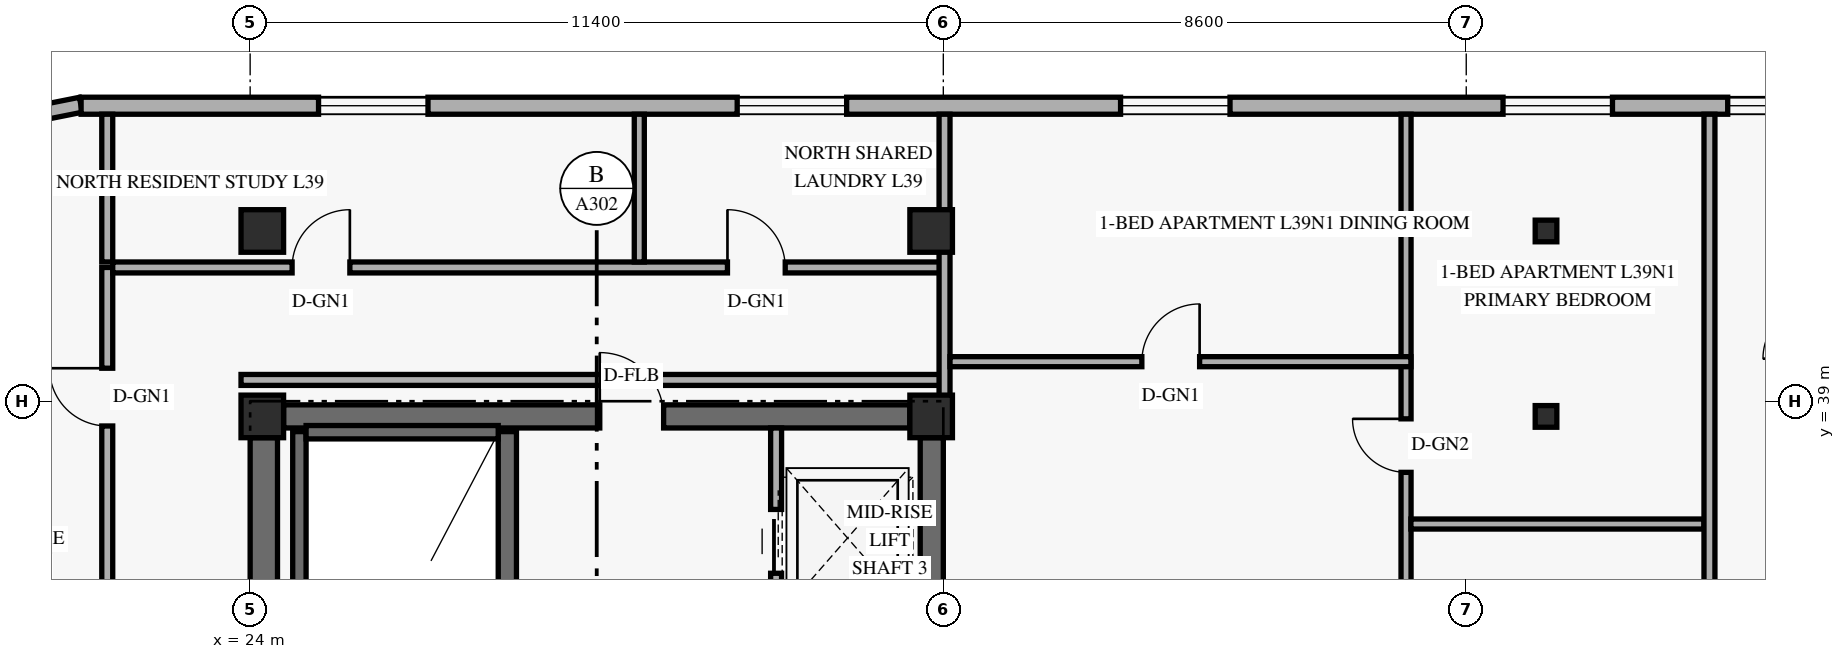
"""IFC4 building model, lengths in metres.
Left out: names, types, materials, properties, quantities, classifications, styles, units other than length and angle.
Written with IfcOpenShell. Run it as: python <this file> out.ifc"""

import sys

from ifc_helpers import new_model, si_unit, direction, frame, frame_2d, origin, origin_2d, place, context, subcontext, project, spatial, rectangle, hollow_rectangle, extrude, element, fill, save


model = new_model("IFC4")
c1 = context("Model", 3, precision=1e-05, world=origin(), true_north=direction((0.0, 1.0)))
c2 = subcontext(c1, "Body", "Model", "MODEL_VIEW")
j1 = project(units=[si_unit("LENGTHUNIT", "METRE"), si_unit("PLANEANGLEUNIT", "RADIAN")], contexts=[c1])
p1 = place(None, origin())
s1 = spatial("IfcSite", under=j1, at=p1, CompositionType="ELEMENT")
p2 = place(p1, origin())
s2 = spatial("IfcBuilding", under=s1, at=p2, CompositionType="ELEMENT")
p3 = place(p2, frame((0.0, 0.0, 151.8)))
s3 = spatial("IfcBuildingStorey", under=s2, at=p3, CompositionType="ELEMENT", Elevation=151.8)
p4 = place(p3, frame((24.225, 30.55, 0.0), z_axis=(0.0, 0.0, 1.0), x_axis=(0.0, 1.0, 0.0)))
e1 = element("IfcWall", 1, at=p4, inside=s3, PredefinedType="SHEAR", context=c2, shape_type="SweptSolid", body=[
    extrude(rectangle(XDim=7.85, YDim=0.45, at=frame_2d((3.925, 0.0))), origin(), (0.0, 0.0, 1.0), 2.748),
])
p5 = place(p3, frame((35.21, 31.35, 0.0), z_axis=(0.0, 0.0, 1.0), x_axis=(0.0, 1.0, 0.0)))
e2 = element("IfcWall", 2, at=p5, inside=s3, PredefinedType="SHEAR", context=c2, shape_type="SweptSolid", body=[
    extrude(rectangle(XDim=7.05, YDim=0.38, at=frame_2d((3.525, 0.0))), origin(), (0.0, 0.0, 1.0), 2.748),
])
p6 = place(p3, frame((24.55, 38.75, 0.0), z_axis=(0.0, 0.0, 1.0), x_axis=(1.0, 0.0, 0.0)))
e3 = element("IfcWall", 3, at=p6, inside=s3, PredefinedType="SHEAR", context=c2, shape_type="SweptSolid", body=[
    extrude(rectangle(XDim=10.3, YDim=0.38, at=frame_2d((5.15, 0.0))), origin(), (0.0, 0.0, 1.0), 3.36),
])
p7 = place(p6, frame((5.2, 0.0, 0.0)))
e4 = element("IfcOpeningElement", 4, at=p7, cuts=e3, PredefinedType="OPENING", context=c2, shape_type="SweptSolid", body=[
    extrude(rectangle(XDim=1.05, YDim=2.15, at=frame_2d((0.525, 1.075))), frame((0.0, 0.2, 0.0), z_axis=(0.0, -1.0, 0.0), x_axis=(1.0, 0.0, 0.0)), (0.0, 0.0, 1.0), 0.4),
])
p8 = place(p3, frame((24.81, 30.74, 0.0), z_axis=(0.0, 0.0, 1.0), x_axis=(0.0, 1.0, 0.0)))
e5 = element("IfcWall", 5, at=p8, inside=s3, PredefinedType="SHEAR", context=c2, shape_type="SweptSolid", body=[
    extrude(rectangle(XDim=7.76, YDim=0.22, at=frame_2d((3.88, 0.0))), origin(), (0.0, 0.0, 1.0), 3.36),
])
p9 = place(p3, frame((28.23, 30.74, 0.0), z_axis=(0.0, 0.0, 1.0), x_axis=(0.0, 1.0, 0.0)))
e6 = element("IfcWall", 6, at=p9, inside=s3, PredefinedType="SHEAR", context=c2, shape_type="SweptSolid", body=[
    extrude(rectangle(XDim=7.76, YDim=0.3, at=frame_2d((3.88, 0.0))), origin(), (0.0, 0.0, 1.0), 3.36),
])
p10 = place(p3, frame((24.92, 38.49, 0.0), z_axis=(0.0, 0.0, 1.0), x_axis=(1.0, 0.0, 0.0)))
e7 = element("IfcWall", 7, at=p10, inside=s3, PredefinedType="SHEAR", context=c2, shape_type="SweptSolid", body=[
    extrude(rectangle(XDim=3.16, YDim=0.22, at=frame_2d((1.58, 0.0))), origin(), (0.0, 0.0, 1.0), 3.36),
])
for number, where, z_axis, x_axis in (
    (8, (24.2, 38.75, 0.0), (0.0, 0.0, 1.0), (1.0, 0.0, 0.0)),
    (9, (24.2, 41.8, 0.0), (0.0, 0.0, 1.0), (1.0, 0.0, 0.0)),
    (10, (35.2, 38.75, 0.0), (0.0, 0.0, 1.0), (1.0, 0.0, 0.0)),
    (11, (35.2, 41.8, 0.0), (0.0, 0.0, 1.0), (1.0, 0.0, 0.0)),
):
    element("IfcColumn", number, at=place(p3, frame(where, z_axis=z_axis, x_axis=x_axis)), inside=s3, PredefinedType="COLUMN", context=c2, shape_type="SweptSolid", body=[
        extrude(rectangle(XDim=0.7, YDim=0.7, at=origin_2d()), origin(), (0.0, 0.0, 1.0), 3.6),
    ])
for number, where, z_axis, x_axis in (
    (12, (45.249, 38.75, 0.0), (0.035, 0.0, 0.999), (0.0, 1.0, 0.0)),
    (13, (45.249, 41.8, 0.0), (0.035, 0.0, 0.999), (0.0, 1.0, 0.0)),
):
    element("IfcColumn", number, at=place(p3, frame(where, z_axis=z_axis, x_axis=x_axis)), inside=s3, PredefinedType="COLUMN", context=c2, shape_type="SweptSolid", body=[
        extrude(hollow_rectangle(XDim=0.356, YDim=0.356, WallThickness=0.016, at=origin_2d()), origin(), (0.0, 0.0, 1.0), 3.602),
    ])
p11 = place(p3, frame((21.217, 43.876, 0.0), z_axis=(0.0, 0.0, 1.0), x_axis=(-0.980809899341, -0.19496651342, 0.0)))
e14 = element("IfcWall", 14, at=p11, inside=s3, PredefinedType="SOLIDWALL", context=c2, shape_type="SweptSolid", body=[
    extrude(rectangle(XDim=1.389, YDim=0.25, at=frame_2d((0.694, 0.0))), origin(), (0.0, 0.0, 1.0), 3.36),
])
p12 = place(p3, frame((54.98, 43.86, 0.0), z_axis=(0.0, 0.0, 1.0), x_axis=(-1.0, 0.0, 0.0)))
e15 = element("IfcWall", 15, at=p12, inside=s3, PredefinedType="SOLIDWALL", context=c2, shape_type="SweptSolid", body=[
    extrude(rectangle(XDim=33.76, YDim=0.28, at=frame_2d((16.88, 0.0))), origin(), (0.0, 0.0, 1.0), 3.36),
])
p13 = place(p12, frame((28.055, 0.0, 0.85)))
e16 = element("IfcOpeningElement", 16, at=p13, cuts=e15, PredefinedType="OPENING", context=c2, shape_type="SweptSolid", body=[
    extrude(rectangle(XDim=1.8, YDim=1.6, at=frame_2d((0.9, 0.8))), frame((0.0, 0.15, 0.0), z_axis=(0.0, -1.0, 0.0), x_axis=(1.0, 0.0, 0.0)), (0.0, 0.0, 1.0), 0.3),
])
p14 = place(p12, frame((21.17, 0.0, 0.85)))
e17 = element("IfcOpeningElement", 17, at=p14, cuts=e15, PredefinedType="OPENING", context=c2, shape_type="SweptSolid", body=[
    extrude(rectangle(XDim=1.8, YDim=1.6, at=frame_2d((0.9, 0.8))), frame((0.0, 0.15, 0.0), z_axis=(0.0, -1.0, 0.0), x_axis=(1.0, 0.0, 0.0)), (0.0, 0.0, 1.0), 0.3),
])
p15 = place(p12, frame((14.865, 0.0, 0.85)))
e18 = element("IfcOpeningElement", 18, at=p15, cuts=e15, PredefinedType="OPENING", context=c2, shape_type="SweptSolid", body=[
    extrude(rectangle(XDim=1.8, YDim=1.6, at=frame_2d((0.9, 0.8))), frame((0.0, 0.15, 0.0), z_axis=(0.0, -1.0, 0.0), x_axis=(1.0, 0.0, 0.0)), (0.0, 0.0, 1.0), 0.3),
])
p16 = place(p12, frame((8.575, 0.0, 0.85)))
e19 = element("IfcOpeningElement", 19, at=p16, cuts=e15, PredefinedType="OPENING", context=c2, shape_type="SweptSolid", body=[
    extrude(rectangle(XDim=1.8, YDim=1.6, at=frame_2d((0.9, 0.8))), frame((0.0, 0.15, 0.0), z_axis=(0.0, -1.0, 0.0), x_axis=(1.0, 0.0, 0.0)), (0.0, 0.0, 1.0), 0.3),
])
p17 = place(p12, frame((5.48, 0.0, 0.85)))
e20 = element("IfcOpeningElement", 20, at=p17, cuts=e15, PredefinedType="OPENING", context=c2, shape_type="SweptSolid", body=[
    extrude(rectangle(XDim=1.2, YDim=1.5, at=frame_2d((0.6, 0.75))), frame((0.0, 0.15, 0.0), z_axis=(0.0, -1.0, 0.0), x_axis=(1.0, 0.0, 0.0)), (0.0, 0.0, 1.0), 0.3),
])
p18 = place(p12, frame((1.69, 0.0, 0.85)))
e21 = element("IfcOpeningElement", 21, at=p18, cuts=e15, PredefinedType="OPENING", context=c2, shape_type="SweptSolid", body=[
    extrude(rectangle(XDim=1.8, YDim=1.6, at=frame_2d((0.9, 0.8))), frame((0.0, 0.15, 0.0), z_axis=(0.0, -1.0, 0.0), x_axis=(1.0, 0.0, 0.0)), (0.0, 0.0, 1.0), 0.3),
])
p19 = place(p3, frame((32.65, 31.35, 0.0), z_axis=(0.0, 0.0, 1.0), x_axis=(0.0, 1.0, 0.0)))
e22 = element("IfcWall", 22, at=p19, inside=s3, PredefinedType="STANDARD", context=c2, shape_type="SweptSolid", body=[
    extrude(rectangle(XDim=7.21, YDim=0.18, at=frame_2d((3.605, 0.0))), origin(), (0.0, 0.0, 1.0), 3.36),
])
p20 = place(p19, frame((0.52, 0.0, 0.0)))
e23 = element("IfcOpeningElement", 23, at=p20, cuts=e22, PredefinedType="OPENING", context=c2, shape_type="SweptSolid", body=[
    extrude(rectangle(XDim=1.05, YDim=2.2, at=frame_2d((0.525, 1.1))), frame((0.0, 0.1, 0.0), z_axis=(0.0, -1.0, 0.0), x_axis=(1.0, 0.0, 0.0)), (0.0, 0.0, 1.0), 0.2),
])
p21 = place(p19, frame((2.67, 0.0, 0.0)))
e24 = element("IfcOpeningElement", 24, at=p21, cuts=e22, PredefinedType="OPENING", context=c2, shape_type="SweptSolid", body=[
    extrude(rectangle(XDim=1.05, YDim=2.2, at=frame_2d((0.525, 1.1))), frame((0.0, 0.1, 0.0), z_axis=(0.0, -1.0, 0.0), x_axis=(1.0, 0.0, 0.0)), (0.0, 0.0, 1.0), 0.2),
])
p22 = place(p19, frame((4.82, 0.0, 0.0)))
e25 = element("IfcOpeningElement", 25, at=p22, cuts=e22, PredefinedType="OPENING", context=c2, shape_type="SweptSolid", body=[
    extrude(rectangle(XDim=1.05, YDim=2.2, at=frame_2d((0.525, 1.1))), frame((0.0, 0.1, 0.0), z_axis=(0.0, -1.0, 0.0), x_axis=(1.0, 0.0, 0.0)), (0.0, 0.0, 1.0), 0.2),
])
p23 = place(p3, frame((21.65, 6.8, 0.0), z_axis=(0.0, 0.0, 1.0), x_axis=(0.0, 1.0, 0.0)))
e26 = element("IfcWall", 26, at=p23, inside=s3, PredefinedType="STANDARD", context=c2, shape_type="SweptSolid", body=[
    extrude(rectangle(XDim=34.4, YDim=0.18, at=frame_2d((17.2, 0.0))), origin(), (0.0, 0.0, 1.0), 2.73),
])
p24 = place(p23, frame((1.883, 0.0, 0.0)))
e27 = element("IfcOpeningElement", 27, at=p24, cuts=e26, PredefinedType="OPENING", context=c2, shape_type="SweptSolid", body=[
    extrude(rectangle(XDim=0.95, YDim=2.15, at=frame_2d((0.475, 1.075))), frame((0.0, 0.1, 0.0), z_axis=(0.0, -1.0, 0.0), x_axis=(1.0, 0.0, 0.0)), (0.0, 0.0, 1.0), 0.2),
])
p25 = place(p23, frame((12.117, 0.0, 0.0)))
e28 = element("IfcOpeningElement", 28, at=p25, cuts=e26, PredefinedType="OPENING", context=c2, shape_type="SweptSolid", body=[
    extrude(rectangle(XDim=0.95, YDim=2.15, at=frame_2d((0.475, 1.075))), frame((0.0, 0.1, 0.0), z_axis=(0.0, -1.0, 0.0), x_axis=(1.0, 0.0, 0.0)), (0.0, 0.0, 1.0), 0.2),
])
p26 = place(p23, frame((22.357, 0.0, 0.0)))
e29 = element("IfcOpeningElement", 29, at=p26, cuts=e26, PredefinedType="OPENING", context=c2, shape_type="SweptSolid", body=[
    extrude(rectangle(XDim=0.95, YDim=2.15, at=frame_2d((0.475, 1.075))), frame((0.0, 0.1, 0.0), z_axis=(0.0, -1.0, 0.0), x_axis=(1.0, 0.0, 0.0)), (0.0, 0.0, 1.0), 0.2),
])
p27 = place(p23, frame((31.792, 0.0, 0.0)))
e30 = element("IfcOpeningElement", 30, at=p27, cuts=e26, PredefinedType="OPENING", context=c2, shape_type="SweptSolid", body=[
    extrude(rectangle(XDim=0.95, YDim=2.15, at=frame_2d((0.475, 1.075))), frame((0.0, 0.1, 0.0), z_axis=(0.0, -1.0, 0.0), x_axis=(1.0, 0.0, 0.0)), (0.0, 0.0, 1.0), 0.2),
])
p28 = place(p3, frame((21.74, 41.2, 0.0), z_axis=(0.0, 0.0, 1.0), x_axis=(1.0, 0.0, 0.0)))
e31 = element("IfcWall", 31, at=p28, inside=s3, PredefinedType="STANDARD", context=c2, shape_type="SweptSolid", body=[
    extrude(rectangle(XDim=13.68, YDim=0.18, at=frame_2d((6.84, 0.0))), origin(), (0.0, 0.0, 1.0), 2.73),
])
p29 = place(p28, frame((2.95, 0.0, 0.0)))
e32 = element("IfcOpeningElement", 32, at=p29, cuts=e31, PredefinedType="OPENING", context=c2, shape_type="SweptSolid", body=[
    extrude(rectangle(XDim=0.95, YDim=2.15, at=frame_2d((0.475, 1.075))), frame((0.0, 0.1, 0.0), z_axis=(0.0, -1.0, 0.0), x_axis=(1.0, 0.0, 0.0)), (0.0, 0.0, 1.0), 0.2),
])
p30 = place(p28, frame((10.11, 0.0, 0.0)))
e33 = element("IfcOpeningElement", 33, at=p30, cuts=e31, PredefinedType="OPENING", context=c2, shape_type="SweptSolid", body=[
    extrude(rectangle(XDim=0.95, YDim=2.15, at=frame_2d((0.475, 1.075))), frame((0.0, 0.1, 0.0), z_axis=(0.0, -1.0, 0.0), x_axis=(1.0, 0.0, 0.0)), (0.0, 0.0, 1.0), 0.2),
])
p31 = place(p3, frame((23.85, 39.35, 0.0), z_axis=(0.0, 0.0, 1.0), x_axis=(1.0, 0.0, 0.0)))
e34 = element("IfcWall", 34, at=p31, inside=s3, PredefinedType="STANDARD", context=c2, shape_type="SweptSolid", body=[
    extrude(rectangle(XDim=11.57, YDim=0.18, at=frame_2d((5.785, 0.0))), origin(), (0.0, 0.0, 1.0), 2.73),
])
p32 = place(p3, frame((21.65, 41.29, 0.0), z_axis=(0.0, 0.0, 1.0), x_axis=(0.0, 1.0, 0.0)))
e35 = element("IfcWall", 35, at=p32, inside=s3, PredefinedType="PARTITIONING", context=c2, shape_type="SweptSolid", body=[
    extrude(rectangle(XDim=2.43, YDim=0.18, at=frame_2d((1.215, 0.0))), origin(), (0.0, 0.0, 1.0), 2.879),
])
p33 = place(p3, frame((35.42, 38.75, 0.0), z_axis=(0.0, 0.0, 1.0), x_axis=(0.0, 1.0, 0.0)))
e36 = element("IfcWall", 36, at=p33, inside=s3, PredefinedType="PARTITIONING", context=c2, shape_type="SweptSolid", body=[
    extrude(rectangle(XDim=4.97, YDim=0.18, at=frame_2d((2.485, 0.0))), origin(), (0.0, 0.0, 1.0), 2.73),
])
p34 = place(p3, frame((43.01, 29.55, 0.0), z_axis=(0.0, 0.0, 1.0), x_axis=(0.0, 1.0, 0.0)))
e37 = element("IfcWall", 37, at=p34, inside=s3, PredefinedType="PARTITIONING", context=c2, shape_type="SweptSolid", body=[
    extrude(rectangle(XDim=14.17, YDim=0.165, at=frame_2d((7.085, 0.0))), origin(), (0.0, 0.0, 1.0), 2.73),
])
p35 = place(p34, frame((4.593, 0.0, 0.0)))
e38 = element("IfcOpeningElement", 38, at=p35, cuts=e37, PredefinedType="OPENING", context=c2, shape_type="SweptSolid", body=[
    extrude(rectangle(XDim=0.88, YDim=2.14, at=frame_2d((0.44, 1.07))), frame((0.0, 0.093, 0.0), z_axis=(0.0, -1.0, 0.0), x_axis=(1.0, 0.0, 0.0)), (0.0, 0.0, 1.0), 0.185),
])
p36 = place(p34, frame((8.28, 0.0, 0.0)))
e39 = element("IfcOpeningElement", 39, at=p36, cuts=e37, PredefinedType="OPENING", context=c2, shape_type="SweptSolid", body=[
    extrude(rectangle(XDim=0.88, YDim=2.12, at=frame_2d((0.44, 1.06))), frame((0.0, 0.093, 0.0), z_axis=(0.0, -1.0, 0.0), x_axis=(1.0, 0.0, 0.0)), (0.0, 0.0, 1.0), 0.185),
])
p37 = place(p3, frame((35.51, 39.65, 0.0), z_axis=(0.0, 0.0, 1.0), x_axis=(1.0, 0.0, 0.0)))
e40 = element("IfcWall", 40, at=p37, inside=s3, PredefinedType="PARTITIONING", context=c2, shape_type="SweptSolid", body=[
    extrude(rectangle(XDim=7.58, YDim=0.165, at=frame_2d((3.79, 0.0))), origin(), (0.0, 0.0, 1.0), 3.36),
])
p38 = place(p37, frame((3.155, 0.0, 0.0)))
e41 = element("IfcOpeningElement", 41, at=p38, cuts=e40, PredefinedType="OPENING", context=c2, shape_type="SweptSolid", body=[
    extrude(rectangle(XDim=0.95, YDim=2.15, at=frame_2d((0.475, 1.075))), frame((0.0, 0.093, 0.0), z_axis=(0.0, -1.0, 0.0), x_axis=(1.0, 0.0, 0.0)), (0.0, 0.0, 1.0), 0.185),
])
p39 = place(p3, frame((43.09, 36.98, 0.0), z_axis=(0.0, 0.0, 1.0), x_axis=(1.0, 0.0, 0.0)))
e42 = element("IfcWall", 42, at=p39, inside=s3, PredefinedType="PARTITIONING", context=c2, shape_type="SweptSolid", body=[
    extrude(rectangle(XDim=4.82, YDim=0.165, at=frame_2d((2.41, 0.0))), origin(), (0.0, 0.0, 1.0), 2.73),
])
p40 = place(p3, frame((48.0, 29.55, 0.0), z_axis=(0.0, 0.0, 1.0), x_axis=(0.0, 1.0, 0.0)))
e43 = element("IfcWall", 43, at=p40, inside=s3, PredefinedType="STANDARD", context=c2, shape_type="SweptSolid", body=[
    extrude(rectangle(XDim=14.17, YDim=0.18, at=frame_2d((7.085, 0.0))), origin(), (0.0, 0.0, 1.0), 2.73),
])
p41 = place(p3, frame((30.4, 41.29, 0.0), z_axis=(0.0, 0.0, 1.0), x_axis=(0.0, 1.0, 0.0)))
e44 = element("IfcWall", 44, at=p41, inside=s3, PredefinedType="PARTITIONING", context=c2, shape_type="SweptSolid", body=[
    extrude(rectangle(XDim=2.43, YDim=0.165, at=frame_2d((1.215, 0.0))), origin(), (0.0, 0.0, 1.0), 2.879),
])
p42 = place(p13, origin())
e45 = element("IfcWindow", 45, at=p42, inside=s3, PartitioningType="SINGLE_PANEL", PredefinedType="WINDOW", context=c2, shape_type="SweptSolid", body=[
    extrude(rectangle(XDim=1.8, YDim=1.6, at=frame_2d((0.9, 0.8))), frame((0.0, 0.03, 0.0), z_axis=(0.0, -1.0, 0.0), x_axis=(1.0, 0.0, 0.0)), (0.0, 0.0, 1.0), 0.06),
])
fill(e16, e45)
p43 = place(p14, origin())
e46 = element("IfcWindow", 46, at=p43, inside=s3, PartitioningType="SINGLE_PANEL", PredefinedType="WINDOW", context=c2, shape_type="SweptSolid", body=[
    extrude(rectangle(XDim=1.8, YDim=1.6, at=frame_2d((0.9, 0.8))), frame((0.0, 0.03, 0.0), z_axis=(0.0, -1.0, 0.0), x_axis=(1.0, 0.0, 0.0)), (0.0, 0.0, 1.0), 0.06),
])
fill(e17, e46)
p44 = place(p15, origin())
e47 = element("IfcWindow", 47, at=p44, inside=s3, PartitioningType="SINGLE_PANEL", PredefinedType="WINDOW", context=c2, shape_type="SweptSolid", body=[
    extrude(rectangle(XDim=1.8, YDim=1.6, at=frame_2d((0.9, 0.8))), frame((0.0, 0.03, 0.0), z_axis=(0.0, -1.0, 0.0), x_axis=(1.0, 0.0, 0.0)), (0.0, 0.0, 1.0), 0.06),
])
fill(e18, e47)
p45 = place(p16, origin())
e48 = element("IfcWindow", 48, at=p45, inside=s3, PartitioningType="SINGLE_PANEL", PredefinedType="WINDOW", context=c2, shape_type="SweptSolid", body=[
    extrude(rectangle(XDim=1.8, YDim=1.6, at=frame_2d((0.9, 0.8))), frame((0.0, 0.03, 0.0), z_axis=(0.0, -1.0, 0.0), x_axis=(1.0, 0.0, 0.0)), (0.0, 0.0, 1.0), 0.06),
])
fill(e19, e48)
p46 = place(p17, origin())
e49 = element("IfcWindow", 49, at=p46, inside=s3, PartitioningType="SINGLE_PANEL", PredefinedType="WINDOW", context=c2, shape_type="SweptSolid", body=[
    extrude(rectangle(XDim=1.2, YDim=1.5, at=frame_2d((0.6, 0.75))), frame((0.0, 0.03, 0.0), z_axis=(0.0, -1.0, 0.0), x_axis=(1.0, 0.0, 0.0)), (0.0, 0.0, 1.0), 0.06),
])
fill(e20, e49)
p47 = place(p22, origin())
e50 = element("IfcDoor", 50, at=p47, inside=s3, OperationType="SLIDING_TO_LEFT", PredefinedType="DOOR", context=c2, shape_type="SweptSolid", body=[
    extrude(rectangle(XDim=1.05, YDim=2.2, at=frame_2d((0.525, 1.1))), frame((0.0, 0.025, 0.0), z_axis=(0.0, -1.0, 0.0), x_axis=(1.0, 0.0, 0.0)), (0.0, 0.0, 1.0), 0.05),
])
fill(e25, e50)
p48 = place(p7, frame((1.05, 0.0, 0.0), z_axis=(0.0, 0.0, 1.0), x_axis=(-1.0, 0.0, 0.0)))
e51 = element("IfcDoor", 51, at=p48, inside=s3, OperationType="SINGLE_SWING_RIGHT", PredefinedType="DOOR", context=c2, shape_type="SweptSolid", body=[
    extrude(rectangle(XDim=1.05, YDim=2.15, at=frame_2d((0.525, 1.075))), frame((0.0, 0.025, 0.0), z_axis=(0.0, -1.0, 0.0), x_axis=(1.0, 0.0, 0.0)), (0.0, 0.0, 1.0), 0.05),
])
fill(e4, e51)
p49 = place(p38, origin())
e52 = element("IfcDoor", 52, at=p49, inside=s3, OperationType="SINGLE_SWING_RIGHT", PredefinedType="DOOR", context=c2, shape_type="SweptSolid", body=[
    extrude(rectangle(XDim=0.95, YDim=2.15, at=frame_2d((0.475, 1.075))), frame((0.0, 0.025, 0.0), z_axis=(0.0, -1.0, 0.0), x_axis=(1.0, 0.0, 0.0)), (0.0, 0.0, 1.0), 0.05),
])
fill(e41, e52)
p50 = place(p36, origin())
e53 = element("IfcDoor", 53, at=p50, inside=s3, OperationType="SINGLE_SWING_RIGHT", PredefinedType="DOOR", context=c2, shape_type="SweptSolid", body=[
    extrude(rectangle(XDim=0.88, YDim=2.12, at=frame_2d((0.44, 1.06))), frame((0.0, 0.025, 0.0), z_axis=(0.0, -1.0, 0.0), x_axis=(1.0, 0.0, 0.0)), (0.0, 0.0, 1.0), 0.05),
])
fill(e39, e53)
p51 = place(p27, origin())
e54 = element("IfcDoor", 54, at=p51, inside=s3, OperationType="SINGLE_SWING_RIGHT", PredefinedType="DOOR", context=c2, shape_type="SweptSolid", body=[
    extrude(rectangle(XDim=0.95, YDim=2.15, at=frame_2d((0.475, 1.075))), frame((0.0, 0.025, 0.0), z_axis=(0.0, -1.0, 0.0), x_axis=(1.0, 0.0, 0.0)), (0.0, 0.0, 1.0), 0.05),
])
fill(e30, e54)
p52 = place(p29, origin())
e55 = element("IfcDoor", 55, at=p52, inside=s3, OperationType="SINGLE_SWING_RIGHT", PredefinedType="DOOR", context=c2, shape_type="SweptSolid", body=[
    extrude(rectangle(XDim=0.95, YDim=2.15, at=frame_2d((0.475, 1.075))), frame((0.0, 0.025, 0.0), z_axis=(0.0, -1.0, 0.0), x_axis=(1.0, 0.0, 0.0)), (0.0, 0.0, 1.0), 0.05),
])
fill(e32, e55)
p53 = place(p30, origin())
e56 = element("IfcDoor", 56, at=p53, inside=s3, OperationType="SINGLE_SWING_LEFT", PredefinedType="DOOR", context=c2, shape_type="SweptSolid", body=[
    extrude(rectangle(XDim=0.95, YDim=2.15, at=frame_2d((0.475, 1.075))), frame((0.0, 0.025, 0.0), z_axis=(0.0, -1.0, 0.0), x_axis=(1.0, 0.0, 0.0)), (0.0, 0.0, 1.0), 0.05),
])
fill(e33, e56)
save(model, sys.argv[1])
